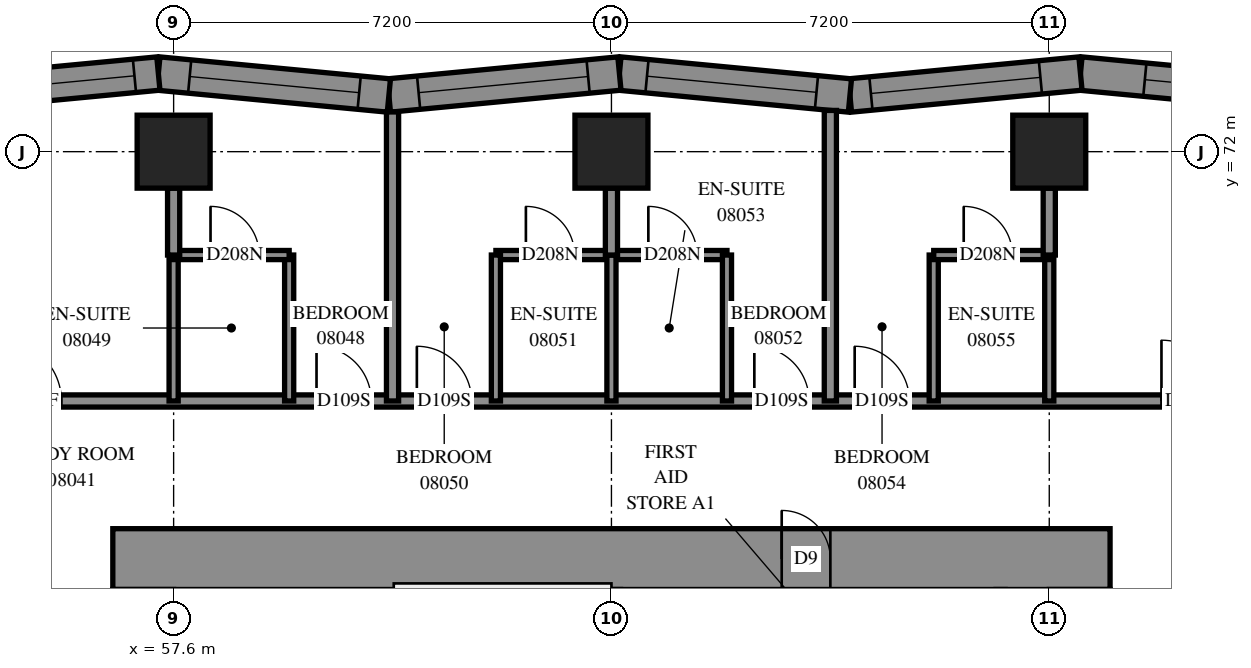
"""IFC4 building model, lengths in metres.
Left out: names, types, materials, properties, quantities, classifications, styles, units other than length and angle.
Written with IfcOpenShell. Run it as: python <this file> out.ifc"""

import sys

from ifc_helpers import new_model, si_unit, direction, frame, frame_2d, origin, origin_2d, place, context, subcontext, project, spatial, polyline, rectangle, outline, extrude, element, fill, save


model = new_model("IFC4")
c1 = context("Model", 3, precision=1e-05, world=origin(), true_north=direction((0.0, 1.0)))
c2 = subcontext(c1, "Body", "Model", "MODEL_VIEW")
j1 = project(units=[si_unit("LENGTHUNIT", "METRE"), si_unit("PLANEANGLEUNIT", "RADIAN")], contexts=[c1])
p1 = place(None, origin())
s1 = spatial("IfcSite", under=j1, at=p1, CompositionType="ELEMENT")
p2 = place(p1, origin())
s2 = spatial("IfcBuilding", under=s1, at=p2, CompositionType="ELEMENT")
p3 = place(p2, frame((0.0, 0.0, 33.8)))
s3 = spatial("IfcBuildingStorey", under=s2, at=p3, CompositionType="ELEMENT", Elevation=33.8)
for number, where, z_axis, x_axis in (
    (1, (57.6, 72.0, 0.0), (0.0, 0.0, 1.0), (1.0, 0.0, 0.0)),
    (2, (64.8, 72.0, 0.0), (0.0, 0.0, 1.0), (1.0, 0.0, 0.0)),
    (3, (72.0, 72.0, 0.0), (0.0, 0.0, 1.0), (1.0, 0.0, 0.0)),
):
    element("IfcColumn", number, at=place(p3, frame(where, z_axis=z_axis, x_axis=x_axis)), inside=s3, PredefinedType="COLUMN", context=c2, shape_type="SweptSolid", body=[
        extrude(rectangle(XDim=1.2, YDim=1.2, at=origin_2d()), origin(), (0.0, 0.0, 1.0), 3.1),
    ])
p4 = place(p3, frame((56.6, 65.3, -0.3), z_axis=(0.0, 0.0, 1.0), x_axis=(1.0, 0.0, 0.0)))
e4 = element("IfcWall", 4, at=p4, inside=s3, PredefinedType="SHEAR", context=c2, shape_type="SweptSolid", body=[
    extrude(rectangle(XDim=16.4, YDim=1.0, at=frame_2d((8.2, 0.0))), origin(), (0.0, 0.0, 1.0), 2.7),
])
p5 = place(p4, frame((11.0, 0.0, 0.3)))
e5 = element("IfcOpeningElement", 5, at=p5, cuts=e4, PredefinedType="OPENING", context=c2, shape_type="SweptSolid", body=[
    extrude(rectangle(XDim=0.8, YDim=2.1, at=frame_2d((0.4, 1.05))), frame((0.0, 0.51, 0.0), z_axis=(0.0, -1.0, 0.0), x_axis=(1.0, 0.0, 0.0)), (0.0, 0.0, 1.0), 1.02),
])
p6 = place(p3, frame((76.326, 72.922, 0.0), z_axis=(0.0, 0.0, 1.0), x_axis=(-0.9954951205, 0.0948127894, 0.0)))
e6 = element("IfcWall", 6, at=p6, inside=s3, PredefinedType="SOLIDWALL", context=c2, shape_type="SweptSolid", body=[
    extrude(outline(polyline([(0.048, -0.275), (3.856, -0.275), (3.803, 0.275), (-0.048, 0.275), (0.048, -0.275)])), origin(), (0.0, 0.0, 1.0), 3.1),
])
p7 = place(p6, frame((1.566, 0.0, 0.5)))
e7 = element("IfcOpeningElement", 7, at=p7, cuts=e6, PredefinedType="OPENING", context=c2, shape_type="SweptSolid", body=[
    extrude(rectangle(XDim=1.2, YDim=2.45, at=frame_2d((0.6, 1.225))), frame((0.0, 0.285, 0.0), z_axis=(0.0, -1.0, 0.0), x_axis=(1.0, 0.0, 0.0)), (0.0, 0.0, 1.0), 0.57),
])
p8 = place(p3, frame((72.513, 73.285, 0.0), z_axis=(0.0, 0.0, 1.0), x_axis=(-0.9954966527, -0.0947967005, 0.0)))
e8 = element("IfcWall", 8, at=p8, inside=s3, PredefinedType="SOLIDWALL", context=c2, shape_type="SweptSolid", body=[
    extrude(outline(polyline([(-0.026, -0.275), (3.782, -0.275), (3.834, 0.275), (0.026, 0.275), (-0.026, -0.275)])), origin(), (0.0, 0.0, 1.0), 3.1),
])
p9 = place(p8, frame((0.662, 0.0, 0.5)))
e9 = element("IfcOpeningElement", 9, at=p9, cuts=e8, PredefinedType="OPENING", context=c2, shape_type="SweptSolid", body=[
    extrude(rectangle(XDim=2.8, YDim=2.45, at=frame_2d((1.4, 1.225))), frame((0.0, 0.285, 0.0), z_axis=(0.0, -1.0, 0.0), x_axis=(1.0, 0.0, 0.0)), (0.0, 0.0, 1.0), 0.57),
])
p10 = place(p3, frame((68.722, 72.924, 0.0), z_axis=(0.0, 0.0, 1.0), x_axis=(-0.9954966527, 0.0947967005, 0.0)))
e10 = element("IfcWall", 10, at=p10, inside=s3, PredefinedType="SOLIDWALL", context=c2, shape_type="SweptSolid", body=[
    extrude(outline(polyline([(0.026, -0.275), (3.834, -0.275), (3.782, 0.275), (-0.026, 0.275), (0.026, -0.275)])), origin(), (0.0, 0.0, 1.0), 3.1),
])
p11 = place(p10, frame((0.553, 0.0, 0.5)))
e11 = element("IfcOpeningElement", 11, at=p11, cuts=e10, PredefinedType="OPENING", context=c2, shape_type="SweptSolid", body=[
    extrude(rectangle(XDim=2.8, YDim=2.45, at=frame_2d((1.4, 1.225))), frame((0.0, 0.285, 0.0), z_axis=(0.0, -1.0, 0.0), x_axis=(1.0, 0.0, 0.0)), (0.0, 0.0, 1.0), 0.57),
])
p12 = place(p3, frame((64.931, 73.285, 0.0), z_axis=(0.0, 0.0, 1.0), x_axis=(-0.9954966527, -0.0947967005, 0.0)))
e12 = element("IfcWall", 12, at=p12, inside=s3, PredefinedType="SOLIDWALL", context=c2, shape_type="SweptSolid", body=[
    extrude(outline(polyline([(-0.026, -0.275), (3.782, -0.275), (3.834, 0.275), (0.026, 0.275), (-0.026, -0.275)])), origin(), (0.0, 0.0, 1.0), 3.1),
])
p13 = place(p12, frame((0.517, 0.0, 0.5)))
e13 = element("IfcOpeningElement", 13, at=p13, cuts=e12, PredefinedType="OPENING", context=c2, shape_type="SweptSolid", body=[
    extrude(rectangle(XDim=2.8, YDim=2.45, at=frame_2d((1.4, 1.225))), frame((0.0, 0.285, 0.0), z_axis=(0.0, -1.0, 0.0), x_axis=(1.0, 0.0, 0.0)), (0.0, 0.0, 1.0), 0.57),
])
p14 = place(p3, frame((61.14, 72.924, 0.0), z_axis=(0.0, 0.0, 1.0), x_axis=(-0.9954966527, 0.0947967005, 0.0)))
e14 = element("IfcWall", 14, at=p14, inside=s3, PredefinedType="SOLIDWALL", context=c2, shape_type="SweptSolid", body=[
    extrude(outline(polyline([(0.026, -0.275), (3.834, -0.275), (3.782, 0.275), (-0.026, 0.275), (0.026, -0.275)])), origin(), (0.0, 0.0, 1.0), 3.1),
])
p15 = place(p14, frame((0.491, 0.0, 0.5)))
e15 = element("IfcOpeningElement", 15, at=p15, cuts=e14, PredefinedType="OPENING", context=c2, shape_type="SweptSolid", body=[
    extrude(rectangle(XDim=2.8, YDim=2.45, at=frame_2d((1.4, 1.225))), frame((0.0, 0.285, 0.0), z_axis=(0.0, -1.0, 0.0), x_axis=(1.0, 0.0, 0.0)), (0.0, 0.0, 1.0), 0.57),
])
p16 = place(p3, frame((57.349, 73.285, 0.0), z_axis=(0.0, 0.0, 1.0), x_axis=(-0.9954966527, -0.0947967005, 0.0)))
e16 = element("IfcWall", 16, at=p16, inside=s3, PredefinedType="SOLIDWALL", context=c2, shape_type="SweptSolid", body=[
    extrude(outline(polyline([(-0.026, -0.275), (3.782, -0.275), (3.834, 0.275), (0.026, 0.275), (-0.026, -0.275)])), origin(), (0.0, 0.0, 1.0), 3.1),
])
p17 = place(p16, frame((0.395, 0.0, 0.5)))
e17 = element("IfcOpeningElement", 17, at=p17, cuts=e16, PredefinedType="OPENING", context=c2, shape_type="SweptSolid", body=[
    extrude(rectangle(XDim=2.8, YDim=2.45, at=frame_2d((1.4, 1.225))), frame((0.0, 0.285, 0.0), z_axis=(0.0, -1.0, 0.0), x_axis=(1.0, 0.0, 0.0)), (0.0, 0.0, 1.0), 0.57),
])
p18 = place(p3, frame((54.5, 67.9, 0.0), z_axis=(0.0, 0.0, 1.0), x_axis=(1.0, 0.0, 0.0)))
e18 = element("IfcWall", 18, at=p18, inside=s3, PredefinedType="PARTITIONING", context=c2, shape_type="SweptSolid", body=[
    extrude(rectangle(XDim=20.6, YDim=0.2, at=frame_2d((10.3, 0.0))), origin(), (0.0, 0.0, 1.0), 3.1),
])
p19 = place(p18, frame((0.255, 0.0, 0.0)))
e19 = element("IfcOpeningElement", 19, at=p19, cuts=e18, PredefinedType="OPENING", context=c2, shape_type="SweptSolid", body=[
    extrude(rectangle(XDim=1.0, YDim=2.1, at=frame_2d((0.5, 1.05))), frame((0.0, 0.11, 0.0), z_axis=(0.0, -1.0, 0.0), x_axis=(1.0, 0.0, 0.0)), (0.0, 0.0, 1.0), 0.22),
])
p20 = place(p18, frame((19.345, 0.0, 0.0)))
e20 = element("IfcOpeningElement", 20, at=p20, cuts=e18, PredefinedType="OPENING", context=c2, shape_type="SweptSolid", body=[
    extrude(rectangle(XDim=1.0, YDim=2.1, at=frame_2d((0.5, 1.05))), frame((0.0, 0.11, 0.0), z_axis=(0.0, -1.0, 0.0), x_axis=(1.0, 0.0, 0.0)), (0.0, 0.0, 1.0), 0.22),
])
p21 = place(p18, frame((5.45, 0.0, 0.0)))
e21 = element("IfcOpeningElement", 21, at=p21, cuts=e18, PredefinedType="OPENING", context=c2, shape_type="SweptSolid", body=[
    extrude(rectangle(XDim=0.9, YDim=2.1, at=frame_2d((0.45, 1.05))), frame((0.0, 0.11, 0.0), z_axis=(0.0, -1.0, 0.0), x_axis=(1.0, 0.0, 0.0)), (0.0, 0.0, 1.0), 0.22),
])
p22 = place(p18, frame((7.1, 0.0, 0.0)))
e22 = element("IfcOpeningElement", 22, at=p22, cuts=e18, PredefinedType="OPENING", context=c2, shape_type="SweptSolid", body=[
    extrude(rectangle(XDim=0.9, YDim=2.1, at=frame_2d((0.45, 1.05))), frame((0.0, 0.11, 0.0), z_axis=(0.0, -1.0, 0.0), x_axis=(1.0, 0.0, 0.0)), (0.0, 0.0, 1.0), 0.22),
])
p23 = place(p18, frame((12.65, 0.0, 0.0)))
e23 = element("IfcOpeningElement", 23, at=p23, cuts=e18, PredefinedType="OPENING", context=c2, shape_type="SweptSolid", body=[
    extrude(rectangle(XDim=0.9, YDim=2.1, at=frame_2d((0.45, 1.05))), frame((0.0, 0.11, 0.0), z_axis=(0.0, -1.0, 0.0), x_axis=(1.0, 0.0, 0.0)), (0.0, 0.0, 1.0), 0.22),
])
p24 = place(p18, frame((14.3, 0.0, 0.0)))
e24 = element("IfcOpeningElement", 24, at=p24, cuts=e18, PredefinedType="OPENING", context=c2, shape_type="SweptSolid", body=[
    extrude(rectangle(XDim=0.9, YDim=2.1, at=frame_2d((0.45, 1.05))), frame((0.0, 0.11, 0.0), z_axis=(0.0, -1.0, 0.0), x_axis=(1.0, 0.0, 0.0)), (0.0, 0.0, 1.0), 0.22),
])
p25 = place(p3, frame((68.4, 67.9, 0.0), z_axis=(0.0, 0.0, 1.0), x_axis=(0.0, 1.0, 0.0)))
e25 = element("IfcWall", 25, at=p25, inside=s3, PredefinedType="PARTITIONING", context=c2, shape_type="SweptSolid", body=[
    extrude(rectangle(XDim=4.778, YDim=0.2, at=frame_2d((2.389, 0.0))), origin(), (0.0, 0.0, 1.0), 3.1),
])
p26 = place(p3, frame((61.2, 67.9, 0.0), z_axis=(0.0, 0.0, 1.0), x_axis=(0.0, 1.0, 0.0)))
e26 = element("IfcWall", 26, at=p26, inside=s3, PredefinedType="PARTITIONING", context=c2, shape_type="SweptSolid", body=[
    extrude(rectangle(XDim=4.753, YDim=0.2, at=frame_2d((2.377, 0.0))), origin(), (0.0, 0.0, 1.0), 3.1),
])
p27 = place(p3, frame((62.9, 70.3, 0.0), z_axis=(0.0, 0.0, 1.0), x_axis=(1.0, 0.0, 0.0)))
e27 = element("IfcWall", 27, at=p27, inside=s3, PredefinedType="PARTITIONING", context=c2, shape_type="SweptSolid", body=[
    extrude(rectangle(XDim=3.8, YDim=0.15, at=frame_2d((1.9, 0.0))), origin(), (0.0, 0.0, 1.0), 3.1),
])
p28 = place(p27, frame((0.493, 0.0, 0.0)))
e28 = element("IfcOpeningElement", 28, at=p28, cuts=e27, PredefinedType="OPENING", context=c2, shape_type="SweptSolid", body=[
    extrude(rectangle(XDim=0.8, YDim=2.1, at=frame_2d((0.4, 1.05))), frame((0.0, 0.085, 0.0), z_axis=(0.0, -1.0, 0.0), x_axis=(1.0, 0.0, 0.0)), (0.0, 0.0, 1.0), 0.17),
])
p29 = place(p27, frame((2.507, 0.0, 0.0)))
e29 = element("IfcOpeningElement", 29, at=p29, cuts=e27, PredefinedType="OPENING", context=c2, shape_type="SweptSolid", body=[
    extrude(rectangle(XDim=0.8, YDim=2.1, at=frame_2d((0.4, 1.05))), frame((0.0, 0.085, 0.0), z_axis=(0.0, -1.0, 0.0), x_axis=(1.0, 0.0, 0.0)), (0.0, 0.0, 1.0), 0.17),
])
for number, where, z_axis, x_axis in (
    (30, (59.5, 67.9, 0.0), (0.0, 0.0, 1.0), (0.0, 1.0, 0.0)),
    (31, (57.6, 67.9, 0.0), (0.0, 0.0, 1.0), (0.0, 1.0, 0.0)),
    (32, (62.9, 67.9, 0.0), (0.0, 0.0, 1.0), (0.0, 1.0, 0.0)),
    (33, (66.7, 67.9, 0.0), (0.0, 0.0, 1.0), (0.0, 1.0, 0.0)),
    (34, (64.8, 67.9, 0.0), (0.0, 0.0, 1.0), (0.0, 1.0, 0.0)),
    (35, (70.1, 67.9, 0.0), (0.0, 0.0, 1.0), (0.0, 1.0, 0.0)),
    (36, (72.0, 67.9, 0.0), (0.0, 0.0, 1.0), (0.0, 1.0, 0.0)),
):
    element("IfcWall", number, at=place(p3, frame(where, z_axis=z_axis, x_axis=x_axis)), inside=s3, PredefinedType="PARTITIONING", context=c2, shape_type="SweptSolid", body=[
        extrude(rectangle(XDim=2.4, YDim=0.15, at=frame_2d((1.2, 0.0))), origin(), (0.0, 0.0, 1.0), 3.1),
    ])
p30 = place(p3, frame((70.1, 70.3, 0.0), z_axis=(0.0, 0.0, 1.0), x_axis=(1.0, 0.0, 0.0)))
e37 = element("IfcWall", 37, at=p30, inside=s3, PredefinedType="PARTITIONING", context=c2, shape_type="SweptSolid", body=[
    extrude(rectangle(XDim=1.9, YDim=0.15, at=frame_2d((0.95, 0.0))), origin(), (0.0, 0.0, 1.0), 3.1),
])
p31 = place(p30, frame((0.493, 0.0, 0.0)))
e38 = element("IfcOpeningElement", 38, at=p31, cuts=e37, PredefinedType="OPENING", context=c2, shape_type="SweptSolid", body=[
    extrude(rectangle(XDim=0.8, YDim=2.1, at=frame_2d((0.4, 1.05))), frame((0.0, 0.085, 0.0), z_axis=(0.0, -1.0, 0.0), x_axis=(1.0, 0.0, 0.0)), (0.0, 0.0, 1.0), 0.17),
])
p32 = place(p3, frame((57.6, 70.3, 0.0), z_axis=(0.0, 0.0, 1.0), x_axis=(1.0, 0.0, 0.0)))
e39 = element("IfcWall", 39, at=p32, inside=s3, PredefinedType="PARTITIONING", context=c2, shape_type="SweptSolid", body=[
    extrude(rectangle(XDim=1.9, YDim=0.15, at=frame_2d((0.95, 0.0))), origin(), (0.0, 0.0, 1.0), 3.1),
])
p33 = place(p32, frame((0.607, 0.0, 0.0)))
e40 = element("IfcOpeningElement", 40, at=p33, cuts=e39, PredefinedType="OPENING", context=c2, shape_type="SweptSolid", body=[
    extrude(rectangle(XDim=0.8, YDim=2.1, at=frame_2d((0.4, 1.05))), frame((0.0, 0.085, 0.0), z_axis=(0.0, -1.0, 0.0), x_axis=(1.0, 0.0, 0.0)), (0.0, 0.0, 1.0), 0.17),
])
for number, where, z_axis, x_axis in (
    (41, (57.6, 70.3, 0.0), (0.0, 0.0, 1.0), (0.0, 1.0, 0.0)),
    (42, (64.8, 70.3, 0.0), (0.0, 0.0, 1.0), (0.0, 1.0, 0.0)),
    (43, (72.0, 70.3, 0.0), (0.0, 0.0, 1.0), (0.0, 1.0, 0.0)),
):
    element("IfcWall", number, at=place(p3, frame(where, z_axis=z_axis, x_axis=x_axis)), inside=s3, PredefinedType="PARTITIONING", context=c2, shape_type="SweptSolid", body=[
        extrude(rectangle(XDim=1.1, YDim=0.2, at=frame_2d((0.55, 0.0))), origin(), (0.0, 0.0, 1.0), 3.1),
    ])
p34 = place(p7, origin())
e44 = element("IfcWindow", 44, at=p34, inside=s3, PartitioningType="SINGLE_PANEL", PredefinedType="WINDOW", context=c2, shape_type="SweptSolid", body=[
    extrude(rectangle(XDim=1.2, YDim=2.45, at=frame_2d((0.6, 1.225))), frame((0.0, 0.155, 0.0), z_axis=(0.0, -1.0, 0.0), x_axis=(1.0, 0.0, 0.0)), (0.0, 0.0, 1.0), 0.06),
])
fill(e7, e44)
p35 = place(p9, origin())
e45 = element("IfcWindow", 45, at=p35, inside=s3, PartitioningType="SINGLE_PANEL", PredefinedType="WINDOW", context=c2, shape_type="SweptSolid", body=[
    extrude(rectangle(XDim=2.8, YDim=2.45, at=frame_2d((1.4, 1.225))), frame((0.0, 0.155, 0.0), z_axis=(0.0, -1.0, 0.0), x_axis=(1.0, 0.0, 0.0)), (0.0, 0.0, 1.0), 0.06),
])
fill(e9, e45)
p36 = place(p11, origin())
e46 = element("IfcWindow", 46, at=p36, inside=s3, PartitioningType="SINGLE_PANEL", PredefinedType="WINDOW", context=c2, shape_type="SweptSolid", body=[
    extrude(rectangle(XDim=2.8, YDim=2.45, at=frame_2d((1.4, 1.225))), frame((0.0, 0.155, 0.0), z_axis=(0.0, -1.0, 0.0), x_axis=(1.0, 0.0, 0.0)), (0.0, 0.0, 1.0), 0.06),
])
fill(e11, e46)
p37 = place(p13, origin())
e47 = element("IfcWindow", 47, at=p37, inside=s3, PartitioningType="SINGLE_PANEL", PredefinedType="WINDOW", context=c2, shape_type="SweptSolid", body=[
    extrude(rectangle(XDim=2.8, YDim=2.45, at=frame_2d((1.4, 1.225))), frame((0.0, 0.155, 0.0), z_axis=(0.0, -1.0, 0.0), x_axis=(1.0, 0.0, 0.0)), (0.0, 0.0, 1.0), 0.06),
])
fill(e13, e47)
p38 = place(p15, origin())
e48 = element("IfcWindow", 48, at=p38, inside=s3, PartitioningType="SINGLE_PANEL", PredefinedType="WINDOW", context=c2, shape_type="SweptSolid", body=[
    extrude(rectangle(XDim=2.8, YDim=2.45, at=frame_2d((1.4, 1.225))), frame((0.0, 0.155, 0.0), z_axis=(0.0, -1.0, 0.0), x_axis=(1.0, 0.0, 0.0)), (0.0, 0.0, 1.0), 0.06),
])
fill(e15, e48)
p39 = place(p17, origin())
e49 = element("IfcWindow", 49, at=p39, inside=s3, PartitioningType="SINGLE_PANEL", PredefinedType="WINDOW", context=c2, shape_type="SweptSolid", body=[
    extrude(rectangle(XDim=2.8, YDim=2.45, at=frame_2d((1.4, 1.225))), frame((0.0, 0.155, 0.0), z_axis=(0.0, -1.0, 0.0), x_axis=(1.0, 0.0, 0.0)), (0.0, 0.0, 1.0), 0.06),
])
fill(e17, e49)
p40 = place(p5, origin())
e50 = element("IfcDoor", 50, at=p40, inside=s3, OperationType="SINGLE_SWING_RIGHT", PredefinedType="DOOR", context=c2, shape_type="SweptSolid", body=[
    extrude(rectangle(XDim=0.8, YDim=2.1, at=frame_2d((0.4, 1.05))), frame((0.0, -0.44, 0.0), z_axis=(0.0, -1.0, 0.0), x_axis=(1.0, 0.0, 0.0)), (0.0, 0.0, 1.0), 0.05),
])
fill(e5, e50)
p41 = place(p19, origin())
e51 = element("IfcDoor", 51, at=p41, inside=s3, OperationType="SINGLE_SWING_LEFT", PredefinedType="DOOR", context=c2, shape_type="SweptSolid", body=[
    extrude(rectangle(XDim=1.0, YDim=2.1, at=frame_2d((0.5, 1.05))), frame((0.0, 0.025, 0.0), z_axis=(0.0, -1.0, 0.0), x_axis=(1.0, 0.0, 0.0)), (0.0, 0.0, 1.0), 0.05),
])
fill(e19, e51)
p42 = place(p20, origin())
e52 = element("IfcDoor", 52, at=p42, inside=s3, OperationType="SINGLE_SWING_RIGHT", PredefinedType="DOOR", context=c2, shape_type="SweptSolid", body=[
    extrude(rectangle(XDim=1.0, YDim=2.1, at=frame_2d((0.5, 1.05))), frame((0.0, 0.025, 0.0), z_axis=(0.0, -1.0, 0.0), x_axis=(1.0, 0.0, 0.0)), (0.0, 0.0, 1.0), 0.05),
])
fill(e20, e52)
p43 = place(p21, origin())
e53 = element("IfcDoor", 53, at=p43, inside=s3, OperationType="SINGLE_SWING_RIGHT", PredefinedType="DOOR", context=c2, shape_type="SweptSolid", body=[
    extrude(rectangle(XDim=0.9, YDim=2.1, at=frame_2d((0.45, 1.05))), frame((0.0, 0.025, 0.0), z_axis=(0.0, -1.0, 0.0), x_axis=(1.0, 0.0, 0.0)), (0.0, 0.0, 1.0), 0.05),
])
fill(e21, e53)
p44 = place(p33, origin())
e54 = element("IfcDoor", 54, at=p44, inside=s3, OperationType="SINGLE_SWING_RIGHT", PredefinedType="DOOR", context=c2, shape_type="SweptSolid", body=[
    extrude(rectangle(XDim=0.8, YDim=2.1, at=frame_2d((0.4, 1.05))), frame((0.0, 0.025, 0.0), z_axis=(0.0, -1.0, 0.0), x_axis=(1.0, 0.0, 0.0)), (0.0, 0.0, 1.0), 0.05),
])
fill(e40, e54)
p45 = place(p22, origin())
e55 = element("IfcDoor", 55, at=p45, inside=s3, OperationType="SINGLE_SWING_LEFT", PredefinedType="DOOR", context=c2, shape_type="SweptSolid", body=[
    extrude(rectangle(XDim=0.9, YDim=2.1, at=frame_2d((0.45, 1.05))), frame((0.0, 0.025, 0.0), z_axis=(0.0, -1.0, 0.0), x_axis=(1.0, 0.0, 0.0)), (0.0, 0.0, 1.0), 0.05),
])
fill(e22, e55)
p46 = place(p28, origin())
e56 = element("IfcDoor", 56, at=p46, inside=s3, OperationType="SINGLE_SWING_RIGHT", PredefinedType="DOOR", context=c2, shape_type="SweptSolid", body=[
    extrude(rectangle(XDim=0.8, YDim=2.1, at=frame_2d((0.4, 1.05))), frame((0.0, 0.025, 0.0), z_axis=(0.0, -1.0, 0.0), x_axis=(1.0, 0.0, 0.0)), (0.0, 0.0, 1.0), 0.05),
])
fill(e28, e56)
p47 = place(p23, origin())
e57 = element("IfcDoor", 57, at=p47, inside=s3, OperationType="SINGLE_SWING_RIGHT", PredefinedType="DOOR", context=c2, shape_type="SweptSolid", body=[
    extrude(rectangle(XDim=0.9, YDim=2.1, at=frame_2d((0.45, 1.05))), frame((0.0, 0.025, 0.0), z_axis=(0.0, -1.0, 0.0), x_axis=(1.0, 0.0, 0.0)), (0.0, 0.0, 1.0), 0.05),
])
fill(e23, e57)
p48 = place(p29, origin())
e58 = element("IfcDoor", 58, at=p48, inside=s3, OperationType="SINGLE_SWING_RIGHT", PredefinedType="DOOR", context=c2, shape_type="SweptSolid", body=[
    extrude(rectangle(XDim=0.8, YDim=2.1, at=frame_2d((0.4, 1.05))), frame((0.0, 0.025, 0.0), z_axis=(0.0, -1.0, 0.0), x_axis=(1.0, 0.0, 0.0)), (0.0, 0.0, 1.0), 0.05),
])
fill(e29, e58)
p49 = place(p24, origin())
e59 = element("IfcDoor", 59, at=p49, inside=s3, OperationType="SINGLE_SWING_LEFT", PredefinedType="DOOR", context=c2, shape_type="SweptSolid", body=[
    extrude(rectangle(XDim=0.9, YDim=2.1, at=frame_2d((0.45, 1.05))), frame((0.0, 0.025, 0.0), z_axis=(0.0, -1.0, 0.0), x_axis=(1.0, 0.0, 0.0)), (0.0, 0.0, 1.0), 0.05),
])
fill(e24, e59)
p50 = place(p31, origin())
e60 = element("IfcDoor", 60, at=p50, inside=s3, OperationType="SINGLE_SWING_RIGHT", PredefinedType="DOOR", context=c2, shape_type="SweptSolid", body=[
    extrude(rectangle(XDim=0.8, YDim=2.1, at=frame_2d((0.4, 1.05))), frame((0.0, 0.025, 0.0), z_axis=(0.0, -1.0, 0.0), x_axis=(1.0, 0.0, 0.0)), (0.0, 0.0, 1.0), 0.05),
])
fill(e38, e60)
save(model, sys.argv[1])
